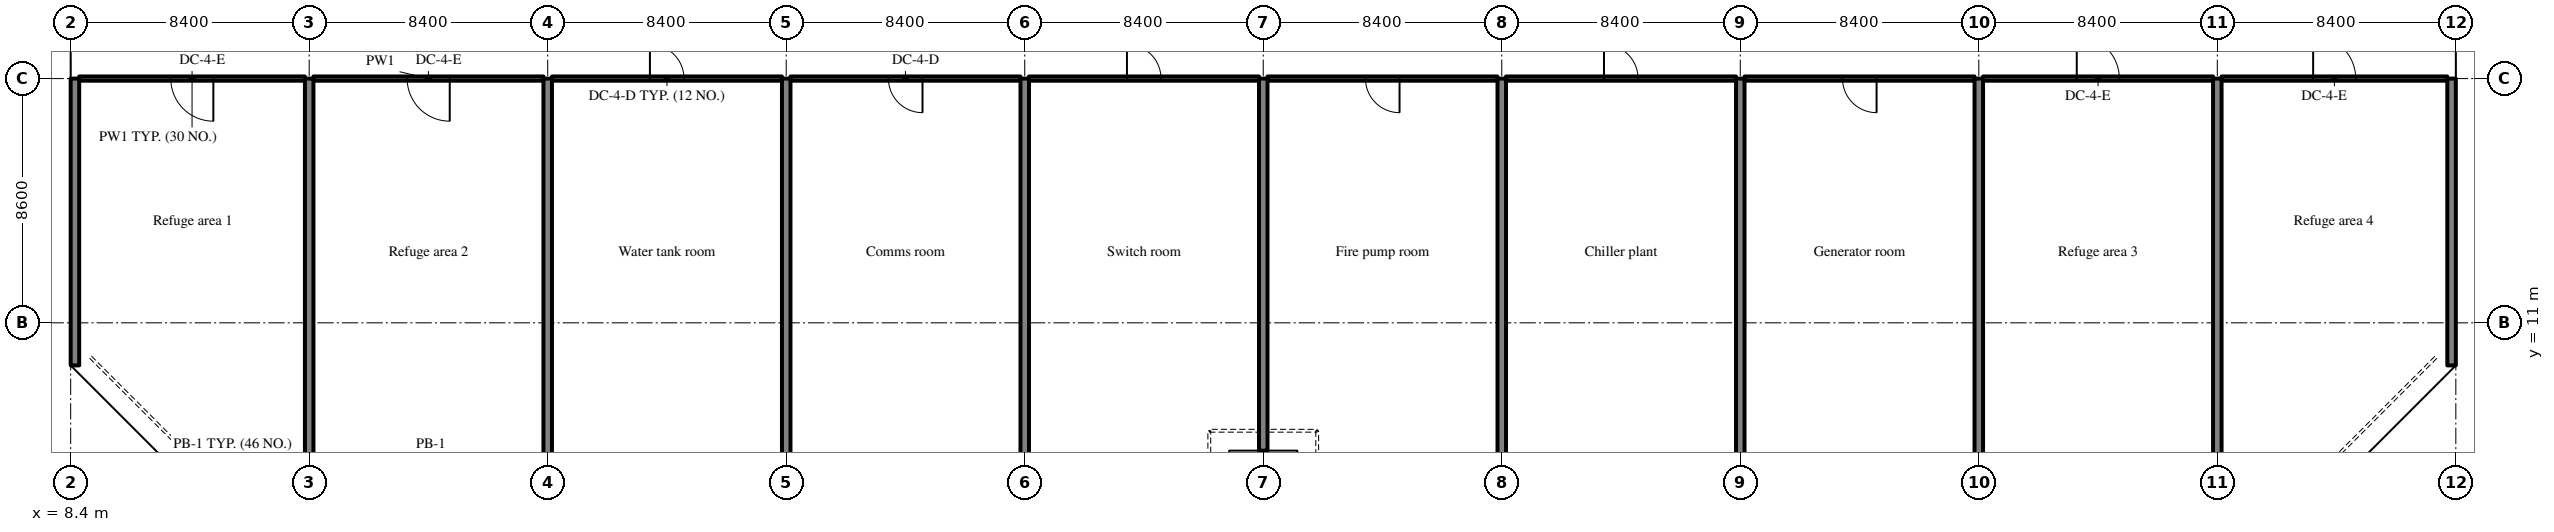
"""IFC4 building model, lengths in metres.
Left out: names, types, materials, properties, quantities, classifications, styles, units other than length and angle.
Written with IfcOpenShell. Run it as: python <this file> out.ifc"""

import sys

from ifc_helpers import new_model, si_unit, direction, frame, frame_2d, origin, place, context, subcontext, project, spatial, rectangle, extrude, source, transform, mapped, element, fill, save


model = new_model("IFC4")
c1 = context("Model", 3, precision=1e-05, world=origin(), true_north=direction((0.0, 1.0)))
c2 = subcontext(c1, "Body", "Model", "MODEL_VIEW")
j1 = project(units=[si_unit("LENGTHUNIT", "METRE"), si_unit("PLANEANGLEUNIT", "RADIAN")], contexts=[c1])
p1 = place(None, origin())
s1 = spatial("IfcSite", under=j1, at=p1, CompositionType="ELEMENT")
p2 = place(p1, origin())
s2 = spatial("IfcBuilding", under=s1, at=p2, CompositionType="ELEMENT")
p3 = place(p2, frame((0.0, 0.0, 201.0)))
s3 = spatial("IfcBuildingStorey", under=s2, at=p3, CompositionType="ELEMENT", Elevation=201.0)
m1 = source(origin(), c2, "Body", "SweptSolid", [
    extrude(rectangle(XDim=10.1, YDim=0.3, at=frame_2d((5.05, 0.0))), origin(), (0.0, 0.0, 1.0), 5.12),
])
p4 = place(p3, frame((8.55, 9.5, 0.0), z_axis=(0.0, 0.0, 1.0), x_axis=(0.0, 1.0, 0.0)))
e1 = element("IfcWall", 1, at=p4, inside=s3, PredefinedType="SHEAR", context=c2, shape_type="MappedRepresentation", body=[
    mapped(m1, transform((0.0, 0.0, 0.0), scale=1.0)),
])
m2 = source(origin(), c2, "Body", "SweptSolid", [
    extrude(rectangle(XDim=14.1, YDim=0.3, at=frame_2d((7.05, 0.0))), origin(), (0.0, 0.0, 1.0), 5.12),
])
for number, where, z_axis, x_axis in (
    (2, (16.8, 5.5, 0.0), (0.0, 0.0, 1.0), (0.0, 1.0, 0.0)),
    (3, (25.2, 5.5, 0.0), (0.0, 0.0, 1.0), (0.0, 1.0, 0.0)),
    (4, (33.6, 5.5, 0.0), (0.0, 0.0, 1.0), (0.0, 1.0, 0.0)),
    (5, (42.0, 5.5, 0.0), (0.0, 0.0, 1.0), (0.0, 1.0, 0.0)),
):
    element("IfcWall", number, at=place(p3, frame(where, z_axis=z_axis, x_axis=x_axis)), inside=s3, PredefinedType="SHEAR", context=c2, shape_type="MappedRepresentation", body=[
        mapped(m2, transform((0.0, 0.0, 0.0), scale=1.0)),
    ])
m3 = source(origin(), c2, "Body", "SweptSolid", [
    extrude(rectangle(XDim=13.1, YDim=0.3, at=frame_2d((6.55, 0.0))), origin(), (0.0, 0.0, 1.0), 5.12),
])
p5 = place(p3, frame((50.4, 6.5, 0.0), z_axis=(0.0, 0.0, 1.0), x_axis=(0.0, 1.0, 0.0)))
e6 = element("IfcWall", 6, at=p5, inside=s3, PredefinedType="SHEAR", context=c2, shape_type="MappedRepresentation", body=[
    mapped(m3, transform((0.0, 0.0, 0.0), scale=1.0)),
])
for number, where, z_axis, x_axis in (
    (7, (58.8, 5.5, 0.0), (0.0, 0.0, 1.0), (0.0, 1.0, 0.0)),
    (8, (67.2, 5.5, 0.0), (0.0, 0.0, 1.0), (0.0, 1.0, 0.0)),
    (9, (75.6, 5.5, 0.0), (0.0, 0.0, 1.0), (0.0, 1.0, 0.0)),
    (10, (84.0, 5.5, 0.0), (0.0, 0.0, 1.0), (0.0, 1.0, 0.0)),
):
    element("IfcWall", number, at=place(p3, frame(where, z_axis=z_axis, x_axis=x_axis)), inside=s3, PredefinedType="SHEAR", context=c2, shape_type="MappedRepresentation", body=[
        mapped(m2, transform((0.0, 0.0, 0.0), scale=1.0)),
    ])
p6 = place(p3, frame((92.25, 9.5, 0.0), z_axis=(0.0, 0.0, 1.0), x_axis=(0.0, 1.0, 0.0)))
e11 = element("IfcWall", 11, at=p6, inside=s3, PredefinedType="SHEAR", context=c2, shape_type="MappedRepresentation", body=[
    mapped(m1, transform((0.0, 0.0, 0.0), scale=1.0)),
])
m4 = source(origin(), c2, "Body", "SweptSolid", [
    extrude(rectangle(XDim=7.95, YDim=0.15, at=frame_2d((3.975, 0.0))), origin(), (0.0, 0.0, 1.0), 4.37),
])
p7 = place(p3, frame((8.7, 19.6, 0.0), z_axis=(0.0, 0.0, 1.0), x_axis=(1.0, 0.0, 0.0)))
e12 = element("IfcWall", 12, at=p7, inside=s3, PredefinedType="PARTITIONING", context=c2, shape_type="MappedRepresentation", body=[
    mapped(m4, transform((0.0, 0.0, 0.0), scale=1.0)),
])
m5 = source(origin(), c2, "Body", "SweptSolid", [
    extrude(rectangle(XDim=1.5, YDim=2.1, at=frame_2d((0.75, 1.05))), frame((0.0, 0.085, 0.0), z_axis=(0.0, -1.0, 0.0), x_axis=(1.0, 0.0, 0.0)), (0.0, 0.0, 1.0), 0.17),
])
p8 = place(p7, frame((3.225, 0.0, 0.0)))
e13 = element("IfcOpeningElement", 13, at=p8, cuts=e12, PredefinedType="OPENING", context=c2, shape_type="MappedRepresentation", body=[
    mapped(m5, transform((0.0, 0.0, 0.0), scale=1.0)),
])
m6 = source(origin(), c2, "Body", "SweptSolid", [
    extrude(rectangle(XDim=8.1, YDim=0.15, at=frame_2d((4.05, 0.0))), origin(), (0.0, 0.0, 1.0), 4.37),
])
p9 = place(p3, frame((16.95, 19.6, 0.0), z_axis=(0.0, 0.0, 1.0), x_axis=(1.0, 0.0, 0.0)))
e14 = element("IfcWall", 14, at=p9, inside=s3, PredefinedType="PARTITIONING", context=c2, shape_type="MappedRepresentation", body=[
    mapped(m6, transform((0.0, 0.0, 0.0), scale=1.0)),
])
p10 = place(p9, frame((3.3, 0.0, 0.0)))
e15 = element("IfcOpeningElement", 15, at=p10, cuts=e14, PredefinedType="OPENING", context=c2, shape_type="MappedRepresentation", body=[
    mapped(m5, transform((0.0, 0.0, 0.0), scale=1.0)),
])
m7 = source(origin(), c2, "Body", "SweptSolid", [
    extrude(rectangle(XDim=8.1, YDim=0.15, at=frame_2d((4.05, 0.0))), origin(), (0.0, 0.0, 1.0), 4.37),
])
p11 = place(p3, frame((25.35, 19.6, 0.0), z_axis=(0.0, 0.0, 1.0), x_axis=(1.0, 0.0, 0.0)))
e16 = element("IfcWall", 16, at=p11, inside=s3, PredefinedType="PARTITIONING", context=c2, shape_type="MappedRepresentation", body=[
    mapped(m7, transform((0.0, 0.0, 0.0), scale=1.0)),
])
m8 = source(origin(), c2, "Body", "SweptSolid", [
    extrude(rectangle(XDim=1.2, YDim=2.1, at=frame_2d((0.6, 1.05))), frame((0.0, 0.085, 0.0), z_axis=(0.0, -1.0, 0.0), x_axis=(1.0, 0.0, 0.0)), (0.0, 0.0, 1.0), 0.17),
])
p12 = place(p11, frame((3.45, 0.0, 0.0)))
e17 = element("IfcOpeningElement", 17, at=p12, cuts=e16, PredefinedType="OPENING", context=c2, shape_type="MappedRepresentation", body=[
    mapped(m8, transform((0.0, 0.0, 0.0), scale=1.0)),
])
p13 = place(p3, frame((33.75, 19.6, 0.0), z_axis=(0.0, 0.0, 1.0), x_axis=(1.0, 0.0, 0.0)))
e18 = element("IfcWall", 18, at=p13, inside=s3, PredefinedType="PARTITIONING", context=c2, shape_type="MappedRepresentation", body=[
    mapped(m6, transform((0.0, 0.0, 0.0), scale=1.0)),
])
p14 = place(p13, frame((3.45, 0.0, 0.0)))
e19 = element("IfcOpeningElement", 19, at=p14, cuts=e18, PredefinedType="OPENING", context=c2, shape_type="MappedRepresentation", body=[
    mapped(m8, transform((0.0, 0.0, 0.0), scale=1.0)),
])
p15 = place(p3, frame((42.15, 19.6, 0.0), z_axis=(0.0, 0.0, 1.0), x_axis=(1.0, 0.0, 0.0)))
e20 = element("IfcWall", 20, at=p15, inside=s3, PredefinedType="PARTITIONING", context=c2, shape_type="MappedRepresentation", body=[
    mapped(m6, transform((0.0, 0.0, 0.0), scale=1.0)),
])
p16 = place(p15, frame((3.45, 0.0, 0.0)))
e21 = element("IfcOpeningElement", 21, at=p16, cuts=e20, PredefinedType="OPENING", context=c2, shape_type="MappedRepresentation", body=[
    mapped(m8, transform((0.0, 0.0, 0.0), scale=1.0)),
])
p17 = place(p3, frame((50.55, 19.6, 0.0), z_axis=(0.0, 0.0, 1.0), x_axis=(1.0, 0.0, 0.0)))
e22 = element("IfcWall", 22, at=p17, inside=s3, PredefinedType="PARTITIONING", context=c2, shape_type="MappedRepresentation", body=[
    mapped(m7, transform((0.0, 0.0, 0.0), scale=1.0)),
])
p18 = place(p17, frame((3.45, 0.0, 0.0)))
e23 = element("IfcOpeningElement", 23, at=p18, cuts=e22, PredefinedType="OPENING", context=c2, shape_type="MappedRepresentation", body=[
    mapped(m8, transform((0.0, 0.0, 0.0), scale=1.0)),
])
p19 = place(p3, frame((58.95, 19.6, 0.0), z_axis=(0.0, 0.0, 1.0), x_axis=(1.0, 0.0, 0.0)))
e24 = element("IfcWall", 24, at=p19, inside=s3, PredefinedType="PARTITIONING", context=c2, shape_type="MappedRepresentation", body=[
    mapped(m6, transform((0.0, 0.0, 0.0), scale=1.0)),
])
p20 = place(p19, frame((3.45, 0.0, 0.0)))
e25 = element("IfcOpeningElement", 25, at=p20, cuts=e24, PredefinedType="OPENING", context=c2, shape_type="MappedRepresentation", body=[
    mapped(m8, transform((0.0, 0.0, 0.0), scale=1.0)),
])
p21 = place(p3, frame((67.35, 19.6, 0.0), z_axis=(0.0, 0.0, 1.0), x_axis=(1.0, 0.0, 0.0)))
e26 = element("IfcWall", 26, at=p21, inside=s3, PredefinedType="PARTITIONING", context=c2, shape_type="MappedRepresentation", body=[
    mapped(m7, transform((0.0, 0.0, 0.0), scale=1.0)),
])
p22 = place(p21, frame((3.45, 0.0, 0.0)))
e27 = element("IfcOpeningElement", 27, at=p22, cuts=e26, PredefinedType="OPENING", context=c2, shape_type="MappedRepresentation", body=[
    mapped(m8, transform((0.0, 0.0, 0.0), scale=1.0)),
])
p23 = place(p3, frame((75.75, 19.6, 0.0), z_axis=(0.0, 0.0, 1.0), x_axis=(1.0, 0.0, 0.0)))
e28 = element("IfcWall", 28, at=p23, inside=s3, PredefinedType="PARTITIONING", context=c2, shape_type="MappedRepresentation", body=[
    mapped(m6, transform((0.0, 0.0, 0.0), scale=1.0)),
])
p24 = place(p23, frame((3.3, 0.0, 0.0)))
e29 = element("IfcOpeningElement", 29, at=p24, cuts=e28, PredefinedType="OPENING", context=c2, shape_type="MappedRepresentation", body=[
    mapped(m5, transform((0.0, 0.0, 0.0), scale=1.0)),
])
m9 = source(origin(), c2, "Body", "SweptSolid", [
    extrude(rectangle(XDim=7.95, YDim=0.15, at=frame_2d((3.975, 0.0))), origin(), (0.0, 0.0, 1.0), 4.37),
])
p25 = place(p3, frame((84.15, 19.6, 0.0), z_axis=(0.0, 0.0, 1.0), x_axis=(1.0, 0.0, 0.0)))
e30 = element("IfcWall", 30, at=p25, inside=s3, PredefinedType="PARTITIONING", context=c2, shape_type="MappedRepresentation", body=[
    mapped(m9, transform((0.0, 0.0, 0.0), scale=1.0)),
])
p26 = place(p25, frame((3.225, 0.0, 0.0)))
e31 = element("IfcOpeningElement", 31, at=p26, cuts=e30, PredefinedType="OPENING", context=c2, shape_type="MappedRepresentation", body=[
    mapped(m5, transform((0.0, 0.0, 0.0), scale=1.0)),
])
m10 = source(origin(), c2, "Body", "SweptSolid", [
    extrude(rectangle(XDim=1.5, YDim=2.1, at=frame_2d((0.75, 1.05))), frame((0.0, 0.025, 0.0), z_axis=(0.0, -1.0, 0.0), x_axis=(1.0, 0.0, 0.0)), (0.0, 0.0, 1.0), 0.05),
])
p27 = place(p8, origin())
e32 = element("IfcDoor", 32, at=p27, inside=s3, OperationType="SINGLE_SWING_RIGHT", PredefinedType="DOOR", context=c2, shape_type="MappedRepresentation", body=[
    mapped(m10, transform((0.0, 0.0, 0.0), scale=1.0)),
])
fill(e13, e32)
p28 = place(p10, origin())
e33 = element("IfcDoor", 33, at=p28, inside=s3, OperationType="SINGLE_SWING_RIGHT", PredefinedType="DOOR", context=c2, shape_type="MappedRepresentation", body=[
    mapped(m10, transform((0.0, 0.0, 0.0), scale=1.0)),
])
fill(e15, e33)
m11 = source(origin(), c2, "Body", "SweptSolid", [
    extrude(rectangle(XDim=1.2, YDim=2.1, at=frame_2d((0.6, 1.05))), frame((0.0, 0.025, 0.0), z_axis=(0.0, -1.0, 0.0), x_axis=(1.0, 0.0, 0.0)), (0.0, 0.0, 1.0), 0.05),
])
p29 = place(p12, origin())
e34 = element("IfcDoor", 34, at=p29, inside=s3, OperationType="SINGLE_SWING_LEFT", PredefinedType="DOOR", context=c2, shape_type="MappedRepresentation", body=[
    mapped(m11, transform((0.0, 0.0, 0.0), scale=1.0)),
])
fill(e17, e34)
p30 = place(p14, origin())
e35 = element("IfcDoor", 35, at=p30, inside=s3, OperationType="SINGLE_SWING_RIGHT", PredefinedType="DOOR", context=c2, shape_type="MappedRepresentation", body=[
    mapped(m11, transform((0.0, 0.0, 0.0), scale=1.0)),
])
fill(e19, e35)
p31 = place(p16, origin())
e36 = element("IfcDoor", 36, at=p31, inside=s3, OperationType="SINGLE_SWING_LEFT", PredefinedType="DOOR", context=c2, shape_type="MappedRepresentation", body=[
    mapped(m11, transform((0.0, 0.0, 0.0), scale=1.0)),
])
fill(e21, e36)
p32 = place(p18, origin())
e37 = element("IfcDoor", 37, at=p32, inside=s3, OperationType="SINGLE_SWING_RIGHT", PredefinedType="DOOR", context=c2, shape_type="MappedRepresentation", body=[
    mapped(m11, transform((0.0, 0.0, 0.0), scale=1.0)),
])
fill(e23, e37)
p33 = place(p20, origin())
e38 = element("IfcDoor", 38, at=p33, inside=s3, OperationType="SINGLE_SWING_LEFT", PredefinedType="DOOR", context=c2, shape_type="MappedRepresentation", body=[
    mapped(m11, transform((0.0, 0.0, 0.0), scale=1.0)),
])
fill(e25, e38)
p34 = place(p22, origin())
e39 = element("IfcDoor", 39, at=p34, inside=s3, OperationType="SINGLE_SWING_RIGHT", PredefinedType="DOOR", context=c2, shape_type="MappedRepresentation", body=[
    mapped(m11, transform((0.0, 0.0, 0.0), scale=1.0)),
])
fill(e27, e39)
p35 = place(p24, origin())
e40 = element("IfcDoor", 40, at=p35, inside=s3, OperationType="SINGLE_SWING_LEFT", PredefinedType="DOOR", context=c2, shape_type="MappedRepresentation", body=[
    mapped(m10, transform((0.0, 0.0, 0.0), scale=1.0)),
])
fill(e29, e40)
p36 = place(p26, origin())
e41 = element("IfcDoor", 41, at=p36, inside=s3, OperationType="SINGLE_SWING_LEFT", PredefinedType="DOOR", context=c2, shape_type="MappedRepresentation", body=[
    mapped(m10, transform((0.0, 0.0, 0.0), scale=1.0)),
])
fill(e31, e41)
save(model, sys.argv[1])
